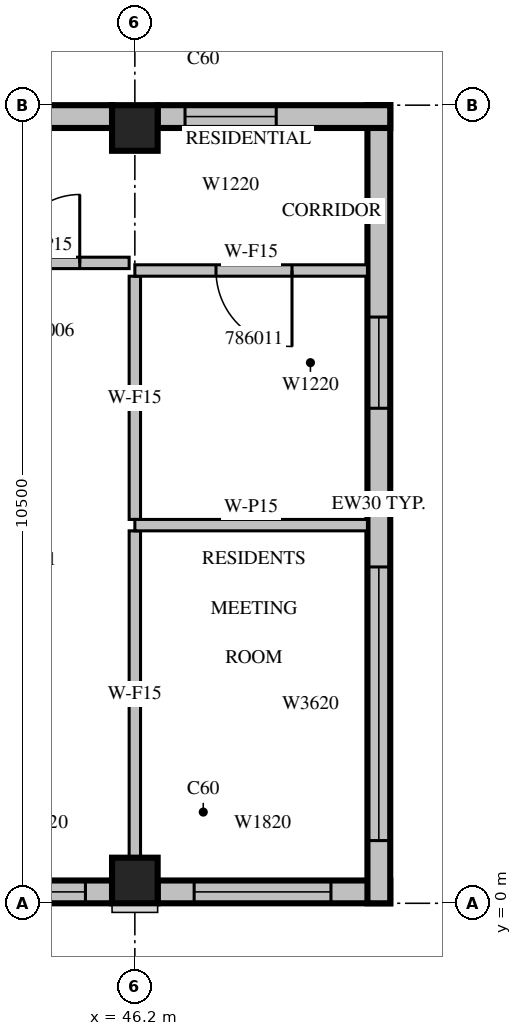
"""IFC4 building model, lengths in metres.
Left out: names, types, materials, properties, quantities, classifications, styles, units other than length and angle.
Written with IfcOpenShell. Run it as: python <this file> out.ifc"""

import sys

from ifc_helpers import new_model, si_unit, direction, frame, frame_2d, origin, origin_2d, place, context, subcontext, project, spatial, rectangle, extrude, source, transform, mapped, element, fill, save


model = new_model("IFC4")
c1 = context("Model", 3, precision=1e-05, world=origin(), true_north=direction((0.0, 1.0)))
c2 = subcontext(c1, "Body", "Model", "MODEL_VIEW")
j1 = project(units=[si_unit("LENGTHUNIT", "METRE"), si_unit("PLANEANGLEUNIT", "RADIAN")], contexts=[c1])
p1 = place(None, origin())
s1 = spatial("IfcSite", under=j1, at=p1, CompositionType="ELEMENT")
p2 = place(p1, origin())
s2 = spatial("IfcBuilding", under=s1, at=p2, CompositionType="ELEMENT")
p3 = place(p2, frame((0.0, 0.0, 361.5)))
s3 = spatial("IfcBuildingStorey", under=s2, at=p3, CompositionType="ELEMENT", Elevation=361.5)
m1 = source(origin(), c2, "Body", "SweptSolid", [
    extrude(rectangle(XDim=0.6, YDim=0.6, at=origin_2d()), origin(), (0.0, 0.0, 1.0), 3.5),
])
for number, where, z_axis, x_axis in (
    (1, (46.2, 0.3, 0.0), (0.0, 0.0, 1.0), (1.0, 0.0, 0.0)),
    (2, (46.2, 10.2, 0.0), (0.0, 0.0, 1.0), (1.0, 0.0, 0.0)),
):
    element("IfcColumn", number, at=place(p3, frame(where, z_axis=z_axis, x_axis=x_axis)), inside=s3, PredefinedType="COLUMN", context=c2, shape_type="MappedRepresentation", body=[
        mapped(m1, transform((0.0, 0.0, 0.0), scale=1.0)),
    ])
m2 = source(origin(), c2, "Body", "SweptSolid", [
    extrude(rectangle(XDim=1.9, YDim=0.3, at=frame_2d((0.95, 0.0))), origin(), (0.0, 0.0, 1.0), 3.1),
])
p4 = place(p3, frame((44.0, 0.15, 0.0), z_axis=(0.0, 0.0, 1.0), x_axis=(1.0, 0.0, 0.0)))
e3 = element("IfcWall", 3, at=p4, inside=s3, PredefinedType="STANDARD", context=c2, shape_type="MappedRepresentation", body=[
    mapped(m2, transform((0.0, 0.0, 0.0), scale=1.0)),
])
m3 = source(origin(), c2, "Body", "SweptSolid", [
    extrude(rectangle(XDim=1.2, YDim=2.0, at=frame_2d((0.6, 1.0))), frame((0.0, 0.16, 0.0), z_axis=(0.0, -1.0, 0.0), x_axis=(1.0, 0.0, 0.0)), (0.0, 0.0, 1.0), 0.32),
])
p5 = place(p4, frame((0.35, 0.0, 0.6)))
e4 = element("IfcOpeningElement", 4, at=p5, cuts=e3, PredefinedType="OPENING", context=c2, shape_type="MappedRepresentation", body=[
    mapped(m3, transform((0.0, 0.0, 0.0), scale=1.0)),
])
m4 = source(origin(), c2, "Body", "SweptSolid", [
    extrude(rectangle(XDim=3.06, YDim=0.3, at=frame_2d((1.53, 0.0))), origin(), (0.0, 0.0, 1.0), 3.1),
])
p6 = place(p3, frame((46.5, 0.15, 0.0), z_axis=(0.0, 0.0, 1.0), x_axis=(1.0, 0.0, 0.0)))
e5 = element("IfcWall", 5, at=p6, inside=s3, PredefinedType="STANDARD", context=c2, shape_type="MappedRepresentation", body=[
    mapped(m4, transform((0.0, 0.0, 0.0), scale=1.0)),
])
m5 = source(origin(), c2, "Body", "SweptSolid", [
    extrude(rectangle(XDim=1.8, YDim=2.0, at=frame_2d((0.9, 1.0))), frame((0.0, 0.16, 0.0), z_axis=(0.0, -1.0, 0.0), x_axis=(1.0, 0.0, 0.0)), (0.0, 0.0, 1.0), 0.32),
])
p7 = place(p6, frame((0.48, 0.0, 0.6)))
e6 = element("IfcOpeningElement", 6, at=p7, cuts=e5, PredefinedType="OPENING", context=c2, shape_type="MappedRepresentation", body=[
    mapped(m5, transform((0.0, 0.0, 0.0), scale=1.0)),
])
m6 = source(origin(), c2, "Body", "SweptSolid", [
    extrude(rectangle(XDim=10.5, YDim=0.3, at=frame_2d((5.25, 0.0))), origin(), (0.0, 0.0, 1.0), 3.1),
])
p8 = place(p3, frame((49.41, 0.0, 0.0), z_axis=(0.0, 0.0, 1.0), x_axis=(0.0, 1.0, 0.0)))
e7 = element("IfcWall", 7, at=p8, inside=s3, PredefinedType="STANDARD", context=c2, shape_type="MappedRepresentation", body=[
    mapped(m6, transform((0.0, 0.0, 0.0), scale=1.0)),
])
m7 = source(origin(), c2, "Body", "SweptSolid", [
    extrude(rectangle(XDim=3.6, YDim=2.0, at=frame_2d((1.8, 1.0))), frame((0.0, 0.16, 0.0), z_axis=(0.0, -1.0, 0.0), x_axis=(1.0, 0.0, 0.0)), (0.0, 0.0, 1.0), 0.32),
])
p9 = place(p8, frame((0.825, 0.0, 0.6)))
e8 = element("IfcOpeningElement", 8, at=p9, cuts=e7, PredefinedType="OPENING", context=c2, shape_type="MappedRepresentation", body=[
    mapped(m7, transform((0.0, 0.0, 0.0), scale=1.0)),
])
p10 = place(p8, frame((6.513, 0.0, 0.6)))
e9 = element("IfcOpeningElement", 9, at=p10, cuts=e7, PredefinedType="OPENING", context=c2, shape_type="MappedRepresentation", body=[
    mapped(m3, transform((0.0, 0.0, 0.0), scale=1.0)),
])
p11 = place(p3, frame((49.56, 10.35, 0.0), z_axis=(0.0, 0.0, 1.0), x_axis=(-1.0, 0.0, 0.0)))
e10 = element("IfcWall", 10, at=p11, inside=s3, PredefinedType="STANDARD", context=c2, shape_type="MappedRepresentation", body=[
    mapped(m4, transform((0.0, 0.0, 0.0), scale=1.0)),
])
p12 = place(p11, frame((1.5, 0.0, 0.6)))
e11 = element("IfcOpeningElement", 11, at=p12, cuts=e10, PredefinedType="OPENING", context=c2, shape_type="MappedRepresentation", body=[
    mapped(m3, transform((0.0, 0.0, 0.0), scale=1.0)),
])
m8 = source(origin(), c2, "Body", "SweptSolid", [
    extrude(rectangle(XDim=7.8, YDim=0.3, at=frame_2d((3.9, 0.0))), origin(), (0.0, 0.0, 1.0), 3.1),
])
p13 = place(p3, frame((45.9, 10.35, 0.0), z_axis=(0.0, 0.0, 1.0), x_axis=(-1.0, 0.0, 0.0)))
e12 = element("IfcWall", 12, at=p13, inside=s3, PredefinedType="STANDARD", context=c2, shape_type="MappedRepresentation", body=[
    mapped(m8, transform((0.0, 0.0, 0.0), scale=1.0)),
])
m9 = source(origin(), c2, "Body", "SweptSolid", [
    extrude(rectangle(XDim=3.0, YDim=2.0, at=frame_2d((1.5, 1.0))), frame((0.0, 0.16, 0.0), z_axis=(0.0, -1.0, 0.0), x_axis=(1.0, 0.0, 0.0)), (0.0, 0.0, 1.0), 0.32),
])
p14 = place(p13, frame((1.14, 0.0, 0.6)))
e13 = element("IfcOpeningElement", 13, at=p14, cuts=e12, PredefinedType="OPENING", context=c2, shape_type="MappedRepresentation", body=[
    mapped(m9, transform((0.0, 0.0, 0.0), scale=1.0)),
])
p15 = place(p13, frame((6.24, 0.0, 0.6)))
e14 = element("IfcOpeningElement", 14, at=p15, cuts=e12, PredefinedType="OPENING", context=c2, shape_type="MappedRepresentation", body=[
    mapped(m3, transform((0.0, 0.0, 0.0), scale=1.0)),
])
m10 = source(origin(), c2, "Body", "SweptSolid", [
    extrude(rectangle(XDim=2.2, YDim=0.15, at=frame_2d((1.1, 0.0))), origin(), (0.0, 0.0, 1.0), 3.1),
])
p16 = place(p3, frame((46.125, 8.425, 0.0), z_axis=(0.0, 0.0, 1.0), x_axis=(-1.0, 0.0, 0.0)))
e15 = element("IfcWall", 15, at=p16, inside=s3, PredefinedType="PARTITIONING", context=c2, shape_type="MappedRepresentation", body=[
    mapped(m10, transform((0.0, 0.0, 0.0), scale=1.0)),
])
m11 = source(origin(), c2, "Body", "SweptSolid", [
    extrude(rectangle(XDim=0.9, YDim=2.1, at=frame_2d((0.45, 1.05))), frame((0.0, 0.085, 0.0), z_axis=(0.0, -1.0, 0.0), x_axis=(1.0, 0.0, 0.0)), (0.0, 0.0, 1.0), 0.17),
])
p17 = place(p16, frame((0.65, 0.0, 0.0)))
e16 = element("IfcOpeningElement", 16, at=p17, cuts=e15, PredefinedType="OPENING", context=c2, shape_type="MappedRepresentation", body=[
    mapped(m11, transform((0.0, 0.0, 0.0), scale=1.0)),
])
m12 = source(origin(), c2, "Body", "SweptSolid", [
    extrude(rectangle(XDim=4.301, YDim=0.15, at=frame_2d((2.151, 0.0))), origin(), (0.0, 0.0, 1.0), 3.1),
])
p18 = place(p3, frame((46.2, 0.599, 0.0), z_axis=(0.0, 0.0, 1.0), x_axis=(0.0, 1.0, 0.0)))
e17 = element("IfcWall", 17, at=p18, inside=s3, PredefinedType="PARTITIONING", context=c2, shape_type="MappedRepresentation", body=[
    mapped(m12, transform((0.0, 0.0, 0.0), scale=1.0)),
])
m13 = source(origin(), c2, "Body", "SweptSolid", [
    extrude(rectangle(XDim=3.2, YDim=0.15, at=frame_2d((1.6, 0.0))), origin(), (0.0, 0.0, 1.0), 3.1),
])
p19 = place(p3, frame((46.2, 5.05, 0.0), z_axis=(0.0, 0.0, 1.0), x_axis=(0.0, 1.0, 0.0)))
e18 = element("IfcWall", 18, at=p19, inside=s3, PredefinedType="PARTITIONING", context=c2, shape_type="MappedRepresentation", body=[
    mapped(m13, transform((0.0, 0.0, 0.0), scale=1.0)),
])
m14 = source(origin(), c2, "Body", "SweptSolid", [
    extrude(rectangle(XDim=3.06, YDim=0.15, at=frame_2d((1.53, 0.0))), origin(), (0.0, 0.0, 1.0), 3.1),
])
p20 = place(p3, frame((49.26, 4.975, 0.0), z_axis=(0.0, 0.0, 1.0), x_axis=(-1.0, 0.0, 0.0)))
e19 = element("IfcWall", 19, at=p20, inside=s3, PredefinedType="PARTITIONING", context=c2, shape_type="MappedRepresentation", body=[
    mapped(m14, transform((0.0, 0.0, 0.0), scale=1.0)),
])
p21 = place(p3, frame((49.26, 8.325, 0.0), z_axis=(0.0, 0.0, 1.0), x_axis=(-1.0, 0.0, 0.0)))
e20 = element("IfcWall", 20, at=p21, inside=s3, PredefinedType="PARTITIONING", context=c2, shape_type="MappedRepresentation", body=[
    mapped(m14, transform((0.0, 0.0, 0.0), scale=1.0)),
])
m15 = source(origin(), c2, "Body", "SweptSolid", [
    extrude(rectangle(XDim=1.0, YDim=2.1, at=frame_2d((0.5, 1.05))), frame((0.0, 0.085, 0.0), z_axis=(0.0, -1.0, 0.0), x_axis=(1.0, 0.0, 0.0)), (0.0, 0.0, 1.0), 0.17),
])
p22 = place(p21, frame((0.993, 0.0, 0.0)))
e21 = element("IfcOpeningElement", 21, at=p22, cuts=e20, PredefinedType="OPENING", context=c2, shape_type="MappedRepresentation", body=[
    mapped(m15, transform((0.0, 0.0, 0.0), scale=1.0)),
])
m16 = source(origin(), c2, "Body", "SweptSolid", [
    extrude(rectangle(XDim=1.2, YDim=2.0, at=frame_2d((0.6, 1.0))), frame((0.0, 0.03, 0.0), z_axis=(0.0, -1.0, 0.0), x_axis=(1.0, 0.0, 0.0)), (0.0, 0.0, 1.0), 0.06),
])
p23 = place(p5, origin())
e22 = element("IfcWindow", 22, at=p23, inside=s3, PartitioningType="SINGLE_PANEL", PredefinedType="WINDOW", context=c2, shape_type="MappedRepresentation", body=[
    mapped(m16, transform((0.0, 0.0, 0.0), scale=1.0)),
])
fill(e4, e22)
m17 = source(origin(), c2, "Body", "SweptSolid", [
    extrude(rectangle(XDim=1.8, YDim=2.0, at=frame_2d((0.9, 1.0))), frame((0.0, 0.03, 0.0), z_axis=(0.0, -1.0, 0.0), x_axis=(1.0, 0.0, 0.0)), (0.0, 0.0, 1.0), 0.06),
])
p24 = place(p7, origin())
e23 = element("IfcWindow", 23, at=p24, inside=s3, PartitioningType="SINGLE_PANEL", PredefinedType="WINDOW", context=c2, shape_type="MappedRepresentation", body=[
    mapped(m17, transform((0.0, 0.0, 0.0), scale=1.0)),
])
fill(e6, e23)
m18 = source(origin(), c2, "Body", "SweptSolid", [
    extrude(rectangle(XDim=3.6, YDim=2.0, at=frame_2d((1.8, 1.0))), frame((0.0, 0.03, 0.0), z_axis=(0.0, -1.0, 0.0), x_axis=(1.0, 0.0, 0.0)), (0.0, 0.0, 1.0), 0.06),
])
p25 = place(p9, origin())
e24 = element("IfcWindow", 24, at=p25, inside=s3, PartitioningType="SINGLE_PANEL", PredefinedType="WINDOW", context=c2, shape_type="MappedRepresentation", body=[
    mapped(m18, transform((0.0, 0.0, 0.0), scale=1.0)),
])
fill(e8, e24)
p26 = place(p10, origin())
e25 = element("IfcWindow", 25, at=p26, inside=s3, PartitioningType="SINGLE_PANEL", PredefinedType="WINDOW", context=c2, shape_type="MappedRepresentation", body=[
    mapped(m16, transform((0.0, 0.0, 0.0), scale=1.0)),
])
fill(e9, e25)
p27 = place(p12, origin())
e26 = element("IfcWindow", 26, at=p27, inside=s3, PartitioningType="SINGLE_PANEL", PredefinedType="WINDOW", context=c2, shape_type="MappedRepresentation", body=[
    mapped(m16, transform((0.0, 0.0, 0.0), scale=1.0)),
])
fill(e11, e26)
m19 = source(origin(), c2, "Body", "SweptSolid", [
    extrude(rectangle(XDim=0.9, YDim=2.1, at=frame_2d((0.45, 1.05))), frame((0.0, 0.025, 0.0), z_axis=(0.0, -1.0, 0.0), x_axis=(1.0, 0.0, 0.0)), (0.0, 0.0, 1.0), 0.05),
])
p28 = place(p17, origin())
e27 = element("IfcDoor", 27, at=p28, inside=s3, OperationType="SINGLE_SWING_RIGHT", PredefinedType="DOOR", context=c2, shape_type="MappedRepresentation", body=[
    mapped(m19, transform((0.0, 0.0, 0.0), scale=1.0)),
])
fill(e16, e27)
m20 = source(origin(), c2, "Body", "SweptSolid", [
    extrude(rectangle(XDim=1.0, YDim=2.1, at=frame_2d((0.5, 1.05))), frame((0.0, 0.025, 0.0), z_axis=(0.0, -1.0, 0.0), x_axis=(1.0, 0.0, 0.0)), (0.0, 0.0, 1.0), 0.05),
])
p29 = place(p22, origin())
e28 = element("IfcDoor", 28, at=p29, inside=s3, OperationType="SINGLE_SWING_LEFT", PredefinedType="DOOR", context=c2, shape_type="MappedRepresentation", body=[
    mapped(m20, transform((0.0, 0.0, 0.0), scale=1.0)),
])
fill(e21, e28)
save(model, sys.argv[1])
